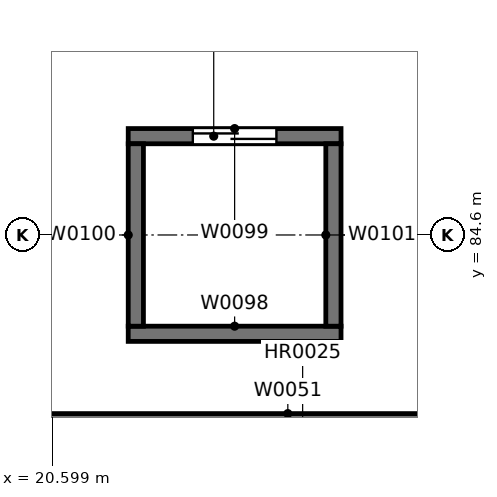
"""IFC4 building model, lengths in metres.
Left out: names, types, materials, properties, quantities, classifications, styles, units other than length and angle.
Written with IfcOpenShell. Run it as: python <this file> out.ifc"""

import sys

from ifc_helpers import new_model, si_unit, direction, frame, frame_2d, origin, place, context, subcontext, project, spatial, rectangle, extrude, element, fill, save


model = new_model("IFC4")
c1 = context("Model", 3, precision=1e-05, world=origin(), true_north=direction((0.0, 1.0)))
c2 = subcontext(c1, "Body", "Model", "MODEL_VIEW")
j1 = project(units=[si_unit("LENGTHUNIT", "METRE"), si_unit("PLANEANGLEUNIT", "RADIAN")], contexts=[c1])
p1 = place(None, origin())
s1 = spatial("IfcSite", under=j1, at=p1, CompositionType="ELEMENT")
p2 = place(p1, origin())
s2 = spatial("IfcBuilding", under=s1, at=p2, CompositionType="ELEMENT")
p3 = place(p2, frame((0.0, 0.0, 19.2)))
s3 = spatial("IfcBuildingStorey", under=s2, at=p3, CompositionType="ELEMENT", Elevation=19.2)
p4 = place(p3, frame((20.0, 82.125, 0.0), z_axis=(0.0, 0.0, 1.0), x_axis=(1.0, 0.0, 0.0)))
e1 = element("IfcWall", 1, at=p4, inside=s3, PredefinedType="SOLIDWALL", context=c2, shape_type="SweptSolid", body=[
    extrude(rectangle(XDim=7.4, YDim=0.25, at=frame_2d((3.7, 0.0))), origin(), (0.0, 0.0, 1.0), 4.8),
])
p5 = place(p4, frame((5.9, 0.0, 0.0)))
e2 = element("IfcOpeningElement", 2, at=p5, cuts=e1, PredefinedType="OPENING", context=c2, shape_type="SweptSolid", body=[
    extrude(rectangle(XDim=1.2, YDim=2.1, at=frame_2d((0.6, 1.05))), frame((0.0, 0.135, 0.0), z_axis=(0.0, -1.0, 0.0), x_axis=(1.0, 0.0, 0.0)), (0.0, 0.0, 1.0), 0.27),
])
p6 = place(p3, frame((21.6, 83.3, 0.0), z_axis=(0.0, 0.0, 1.0), x_axis=(1.0, 0.0, 0.0)))
e3 = element("IfcWall", 3, at=p6, inside=s3, PredefinedType="SOLIDWALL", context=c2, shape_type="SweptSolid", body=[
    extrude(rectangle(XDim=2.8, YDim=0.2, at=frame_2d((1.4, 0.0))), origin(), (0.0, 0.0, 1.0), 4.8),
])
p7 = place(p3, frame((21.6, 85.9, 0.0), z_axis=(0.0, 0.0, 1.0), x_axis=(1.0, 0.0, 0.0)))
e4 = element("IfcWall", 4, at=p7, inside=s3, PredefinedType="SOLIDWALL", context=c2, shape_type="SweptSolid", body=[
    extrude(rectangle(XDim=2.8, YDim=0.2, at=frame_2d((1.4, 0.0))), origin(), (0.0, 0.0, 1.0), 4.8),
])
p8 = place(p7, frame((0.85, 0.0, 0.0)))
e5 = element("IfcOpeningElement", 5, at=p8, cuts=e4, PredefinedType="OPENING", context=c2, shape_type="SweptSolid", body=[
    extrude(rectangle(XDim=1.1, YDim=2.1, at=frame_2d((0.55, 1.05))), frame((0.0, 0.11, 0.0), z_axis=(0.0, -1.0, 0.0), x_axis=(1.0, 0.0, 0.0)), (0.0, 0.0, 1.0), 0.22),
])
for number, where, z_axis, x_axis in (
    (6, (21.7, 83.4, 0.0), (0.0, 0.0, 1.0), (0.0, 1.0, 0.0)),
    (7, (24.3, 83.4, 0.0), (0.0, 0.0, 1.0), (0.0, 1.0, 0.0)),
):
    element("IfcWall", number, at=place(p3, frame(where, z_axis=z_axis, x_axis=x_axis)), inside=s3, PredefinedType="SOLIDWALL", context=c2, shape_type="SweptSolid", body=[
        extrude(rectangle(XDim=2.4, YDim=0.2, at=frame_2d((1.2, 0.0))), origin(), (0.0, 0.0, 1.0), 4.8),
    ])
p9 = place(p8, origin())
e8 = element("IfcDoor", 8, at=p9, inside=s3, OperationType="SLIDING_TO_LEFT", PredefinedType="DOOR", context=c2, shape_type="SweptSolid", body=[
    extrude(rectangle(XDim=1.1, YDim=2.1, at=frame_2d((0.55, 1.05))), frame((0.0, 0.025, 0.0), z_axis=(0.0, -1.0, 0.0), x_axis=(1.0, 0.0, 0.0)), (0.0, 0.0, 1.0), 0.05),
])
fill(e5, e8)
save(model, sys.argv[1])
